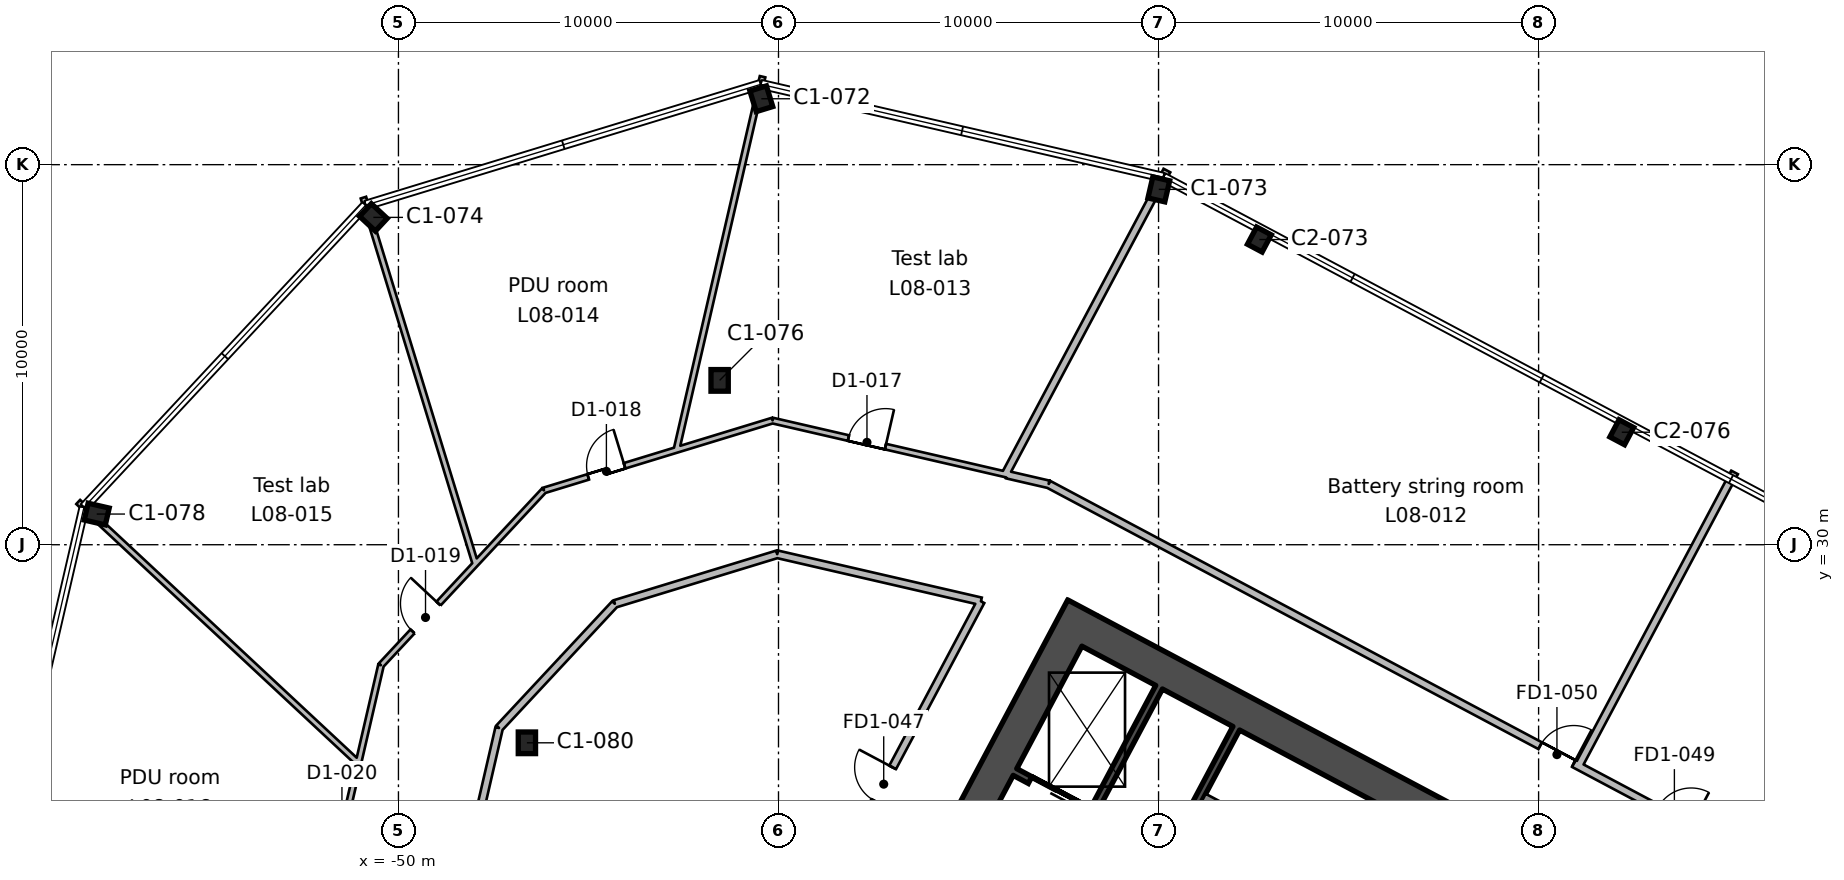
"""IFC4 building model, lengths in metres.
Left out: names, types, materials, properties, quantities, classifications, styles, units other than length and angle.
Written with IfcOpenShell. Run it as: python <this file> out.ifc"""

import sys

from ifc_helpers import new_model, si_unit, direction, frame, frame_2d, origin, origin_2d, place, context, subcontext, project, spatial, rectangle, i_section, extrude, element, fill, save


model = new_model("IFC4")
c1 = context("Model", 3, precision=1e-05, world=origin(), true_north=direction((0.0, 1.0)))
c2 = subcontext(c1, "Body", "Model", "MODEL_VIEW")
j1 = project(units=[si_unit("LENGTHUNIT", "METRE"), si_unit("PLANEANGLEUNIT", "RADIAN")], contexts=[c1])
p1 = place(None, origin())
s1 = spatial("IfcSite", under=j1, at=p1, CompositionType="ELEMENT")
p2 = place(p1, origin())
s2 = spatial("IfcBuilding", under=s1, at=p2, CompositionType="ELEMENT")
p3 = place(p2, frame((0.0, 0.0, 44.6)))
s3 = spatial("IfcBuildingStorey", under=s2, at=p3, CompositionType="ELEMENT", Elevation=44.6)
for number, where, z_axis, x_axis in (
    (1, (-46.62, 24.788, 0.0), (0.0, 0.0, 1.0), (1.0, 0.0, 0.0)),
    (2, (-57.939, 30.807, 0.0), (0.0, 0.0, 1.0), (-0.225, -0.974, 0.0)),
):
    element("IfcColumn", number, at=place(p3, frame(where, z_axis=z_axis, x_axis=x_axis)), inside=s3, PredefinedType="COLUMN", context=c2, shape_type="SweptSolid", body=[
        extrude(i_section(OverallWidth=0.455, OverallDepth=0.569, WebThickness=0.078, FlangeThickness=0.125, FilletRadius=0.015, at=origin_2d()), origin(), (0.0, 0.0, 1.0), 5.4),
    ])
p4 = place(p3, frame((-17.811, 32.96, 0.0), z_axis=(0.0, 0.0, 1.0), x_axis=(-0.882947592859, 0.469471562786, 0.0)))
e3 = element("IfcColumn", 3, at=p4, inside=s3, PredefinedType="COLUMN", context=c2, shape_type="SweptSolid", body=[
    extrude(i_section(OverallWidth=0.437, OverallDepth=0.513, WebThickness=0.061, FlangeThickness=0.097, FilletRadius=0.015, at=origin_2d()), origin(), (0.0, 0.0, 1.0), 5.4),
])
p5 = place(p3, frame((-41.549, 34.324, 0.0), z_axis=(0.0, 0.0, 1.0), x_axis=(1.0, 0.0, 0.0)))
e4 = element("IfcColumn", 4, at=p5, inside=s3, PredefinedType="COLUMN", context=c2, shape_type="SweptSolid", body=[
    extrude(i_section(OverallWidth=0.455, OverallDepth=0.569, WebThickness=0.078, FlangeThickness=0.125, FilletRadius=0.015, at=origin_2d()), origin(), (0.0, 0.0, 1.0), 5.4),
])
p6 = place(p3, frame((-27.347, 38.03, 0.0), z_axis=(0.0, 0.0, 1.0), x_axis=(-0.882947592859, 0.469471562786, 0.0)))
e5 = element("IfcColumn", 5, at=p6, inside=s3, PredefinedType="COLUMN", context=c2, shape_type="SweptSolid", body=[
    extrude(i_section(OverallWidth=0.437, OverallDepth=0.513, WebThickness=0.061, FlangeThickness=0.097, FilletRadius=0.015, at=origin_2d()), origin(), (0.0, 0.0, 1.0), 5.4),
])
for number, where, z_axis, x_axis in (
    (6, (-50.66, 38.613, 0.0), (0.0, 0.0, 1.0), (-0.682, -0.731, 0.0)),
    (7, (-29.993, 39.35, 0.0), (0.0, 0.0, 1.0), (-0.974, 0.225, 0.0)),
    (8, (-40.452, 41.734, 0.0), (0.0, 0.0, 1.0), (-0.956, -0.292, 0.0)),
):
    element("IfcColumn", number, at=place(p3, frame(where, z_axis=z_axis, x_axis=x_axis)), inside=s3, PredefinedType="COLUMN", context=c2, shape_type="SweptSolid", body=[
        extrude(i_section(OverallWidth=0.455, OverallDepth=0.569, WebThickness=0.078, FlangeThickness=0.125, FilletRadius=0.015, at=origin_2d()), origin(), (0.0, 0.0, 1.0), 5.4),
    ])
p7 = place(p3, frame((-31.992, 28.336, 0.0), z_axis=(0.0, 0.0, 1.0), x_axis=(-0.46947084998, -0.882947971864, 0.0)))
e9 = element("IfcWall", 9, at=p7, inside=s3, PredefinedType="SHEAR", context=c2, shape_type="SweptSolid", body=[
    extrude(rectangle(XDim=20.0, YDim=0.9, at=frame_2d((10.0, 0.0))), origin(), (0.0, 0.0, 1.0), 5.4),
])
p8 = place(p7, frame((10.6, 0.0, 0.0)))
e10 = element("IfcOpeningElement", 10, at=p8, cuts=e9, PredefinedType="OPENING", context=c2, shape_type="SweptSolid", body=[
    extrude(rectangle(XDim=2.4, YDim=2.4, at=frame_2d((1.2, 1.2))), frame((0.0, 0.46, 0.0), z_axis=(0.0, -1.0, 0.0), x_axis=(1.0, 0.0, 0.0)), (0.0, 0.0, 1.0), 0.92),
])
p9 = place(p3, frame((-13.97, 18.244, 0.0), z_axis=(0.0, 0.0, 1.0), x_axis=(-0.88294509198, 0.469476266226, 0.0)))
e11 = element("IfcWall", 11, at=p9, inside=s3, PredefinedType="SHEAR", context=c2, shape_type="SweptSolid", body=[
    extrude(rectangle(XDim=20.2, YDim=0.9, at=frame_2d((10.1, 0.0))), origin(), (0.0, 0.0, 1.0), 5.4),
])
p10 = place(p3, frame((-27.955, 25.171, 0.0), z_axis=(0.0, 0.0, 1.0), x_axis=(-0.469480409012, -0.88294288918, 0.0)))
e12 = element("IfcWall", 12, at=p10, inside=s3, PredefinedType="SHEAR", context=c2, shape_type="SweptSolid", body=[
    extrude(rectangle(XDim=7.3, YDim=0.2, at=frame_2d((3.65, 0.0))), origin(), (0.0, 0.0, 1.0), 5.4),
])
p11 = place(p3, frame((-29.986, 26.25, 0.0), z_axis=(0.0, 0.0, 1.0), x_axis=(-0.469494272526, -0.882935517501, 0.0)))
e13 = element("IfcWall", 13, at=p11, inside=s3, PredefinedType="SHEAR", context=c2, shape_type="SweptSolid", body=[
    extrude(rectangle(XDim=3.65, YDim=0.2, at=frame_2d((1.825, 0.0))), origin(), (0.0, 0.0, 1.0), 5.4),
])
p12 = place(p3, frame((-24.215, 20.917, 0.0), z_axis=(0.0, 0.0, 1.0), x_axis=(-0.882964314875, 0.469440111896, 0.0)))
e14 = element("IfcWall", 14, at=p12, inside=s3, PredefinedType="SOLIDWALL", context=c2, shape_type="SweptSolid", body=[
    extrude(rectangle(XDim=5.2, YDim=0.2, at=frame_2d((2.6, 0.0))), origin(), (0.0, 0.0, 1.0), 5.4),
])
p13 = place(p3, frame((-29.804, 21.906, 0.0), z_axis=(0.0, 0.0, 1.0), x_axis=(-0.882960433586, 0.469447412093, 0.0)))
e15 = element("IfcWall", 15, at=p13, inside=s3, PredefinedType="SHEAR", context=c2, shape_type="SweptSolid", body=[
    extrude(rectangle(XDim=4.5, YDim=0.2, at=frame_2d((2.25, 0.0))), origin(), (0.0, 0.0, 1.0), 5.4),
])
p14 = place(p13, frame((2.65, 0.0, 0.0)))
e16 = element("IfcOpeningElement", 16, at=p14, cuts=e15, PredefinedType="OPENING", context=c2, shape_type="SweptSolid", body=[
    extrude(rectangle(XDim=1.4, YDim=2.4, at=frame_2d((0.7, 1.2))), frame((0.0, 0.11, 0.0), z_axis=(0.0, -1.0, 0.0), x_axis=(1.0, 0.0, 0.0)), (0.0, 0.0, 1.0), 0.22),
])
p15 = place(p3, frame((-58.427, 31.125, 0.0), z_axis=(0.0, 0.0, 1.0), x_axis=(0.731473963822, -0.681869371838, 0.0)))
e17 = element("IfcWall", 17, at=p15, inside=s3, PredefinedType="PARTITIONING", context=c2, shape_type="SweptSolid", body=[
    extrude(rectangle(XDim=10.08, YDim=0.15, at=frame_2d((5.04, 0.0))), origin(), (0.0, 0.0, 1.0), 4.95),
])
p16 = place(p3, frame((-51.041, 24.311, 0.0), z_axis=(0.0, 0.0, 1.0), x_axis=(-0.224893203367, -0.974383418927, 0.0)))
e18 = element("IfcWall", 18, at=p16, inside=s3, PredefinedType="PARTITIONING", context=c2, shape_type="SweptSolid", body=[
    extrude(rectangle(XDim=3.704, YDim=0.15, at=frame_2d((1.852, 0.0))), origin(), (0.0, 0.0, 1.0), 4.95),
])
p17 = place(p16, frame((1.482, 0.0, 0.0)))
e19 = element("IfcOpeningElement", 19, at=p17, cuts=e18, PredefinedType="OPENING", context=c2, shape_type="SweptSolid", body=[
    extrude(rectangle(XDim=1.0, YDim=2.1, at=frame_2d((0.5, 1.05))), frame((0.0, 0.085, 0.0), z_axis=(0.0, -1.0, 0.0), x_axis=(1.0, 0.0, 0.0)), (0.0, 0.0, 1.0), 0.17),
])
p18 = place(p3, frame((-47.933, 29.538, 0.0), z_axis=(0.0, 0.0, 1.0), x_axis=(-0.682088017664, -0.731270084277, 0.0)))
e20 = element("IfcWall", 20, at=p18, inside=s3, PredefinedType="PARTITIONING", context=c2, shape_type="SweptSolid", body=[
    extrude(rectangle(XDim=3.703, YDim=0.15, at=frame_2d((1.852, 0.0))), origin(), (0.0, 0.0, 1.0), 4.95),
])
p19 = place(p18, frame((1.486, 0.0, 0.0)))
e21 = element("IfcOpeningElement", 21, at=p19, cuts=e20, PredefinedType="OPENING", context=c2, shape_type="SweptSolid", body=[
    extrude(rectangle(XDim=1.0, YDim=2.1, at=frame_2d((0.5, 1.05))), frame((0.0, 0.085, 0.0), z_axis=(0.0, -1.0, 0.0), x_axis=(1.0, 0.0, 0.0)), (0.0, 0.0, 1.0), 0.17),
])
p20 = place(p3, frame((-50.459, 26.83, 0.0), z_axis=(0.0, 0.0, 1.0), x_axis=(-0.225121568864, -0.974330682691, 0.0)))
e22 = element("IfcWall", 22, at=p20, inside=s3, PredefinedType="PARTITIONING", context=c2, shape_type="SweptSolid", body=[
    extrude(rectangle(XDim=2.585, YDim=0.15, at=frame_2d((1.293, 0.0))), origin(), (0.0, 0.0, 1.0), 4.95),
])
p21 = place(p3, frame((-50.922, 39.133, 0.0), z_axis=(0.0, 0.0, 1.0), x_axis=(0.292463432429, -0.956276707178, 0.0)))
e23 = element("IfcWall", 23, at=p21, inside=s3, PredefinedType="PARTITIONING", context=c2, shape_type="SweptSolid", body=[
    extrude(rectangle(XDim=10.08, YDim=0.15, at=frame_2d((5.04, 0.0))), origin(), (0.0, 0.0, 1.0), 4.95),
])
p22 = place(p3, frame((-48.138, 21.768, 0.0), z_axis=(0.0, 0.0, 1.0), x_axis=(0.224910471472, 0.974379433189, 0.0)))
e24 = element("IfcWall", 24, at=p22, inside=s3, PredefinedType="PARTITIONING", context=c2, shape_type="SweptSolid", body=[
    extrude(rectangle(XDim=3.499, YDim=0.2, at=frame_2d((1.749, 0.0))), origin(), (0.0, 0.0, 1.0), 4.95),
])
p23 = place(p3, frame((-47.351, 25.177, 0.0), z_axis=(0.0, 0.0, 1.0), x_axis=(0.681950982626, 0.731397878925, 0.0)))
e25 = element("IfcWall", 25, at=p23, inside=s3, PredefinedType="PARTITIONING", context=c2, shape_type="SweptSolid", body=[
    extrude(rectangle(XDim=2.464, YDim=0.2, at=frame_2d((1.232, 0.0))), origin(), (0.0, 0.0, 1.0), 4.95),
])
p24 = place(p3, frame((-42.653, 32.504, 0.0), z_axis=(0.0, 0.0, 1.0), x_axis=(-0.95632425254, -0.292307926687, 0.0)))
e26 = element("IfcWall", 26, at=p24, inside=s3, PredefinedType="PARTITIONING", context=c2, shape_type="SweptSolid", body=[
    extrude(rectangle(XDim=3.677, YDim=0.15, at=frame_2d((1.839, 0.0))), origin(), (0.0, 0.0, 1.0), 4.95),
])
p25 = place(p24, frame((1.461, 0.0, 0.0)))
e27 = element("IfcOpeningElement", 27, at=p25, cuts=e26, PredefinedType="OPENING", context=c2, shape_type="SweptSolid", body=[
    extrude(rectangle(XDim=1.0, YDim=2.1, at=frame_2d((0.5, 1.05))), frame((0.0, 0.085, 0.0), z_axis=(0.0, -1.0, 0.0), x_axis=(1.0, 0.0, 0.0)), (0.0, 0.0, 1.0), 0.17),
])
p26 = place(p3, frame((-46.17, 31.429, 0.0), z_axis=(0.0, 0.0, 1.0), x_axis=(-0.68198172509, -0.731369213628, 0.0)))
e28 = element("IfcWall", 28, at=p26, inside=s3, PredefinedType="PARTITIONING", context=c2, shape_type="SweptSolid", body=[
    extrude(rectangle(XDim=2.585, YDim=0.15, at=frame_2d((1.293, 0.0))), origin(), (0.0, 0.0, 1.0), 4.95),
])
p27 = place(p3, frame((-40.034, 29.749, 0.0), z_axis=(0.0, 0.0, 1.0), x_axis=(-0.956357512161, -0.29219909126, 0.0)))
e29 = element("IfcWall", 29, at=p27, inside=s3, PredefinedType="PARTITIONING", context=c2, shape_type="SweptSolid", body=[
    extrude(rectangle(XDim=4.466, YDim=0.2, at=frame_2d((2.233, 0.0))), origin(), (0.0, 0.0, 1.0), 4.95),
])
p28 = place(p3, frame((-44.305, 28.444, 0.0), z_axis=(0.0, 0.0, 1.0), x_axis=(-0.681931663517, -0.731415891469, 0.0)))
e30 = element("IfcWall", 30, at=p28, inside=s3, PredefinedType="PARTITIONING", context=c2, shape_type="SweptSolid", body=[
    extrude(rectangle(XDim=2.003, YDim=0.2, at=frame_2d((1.001, 0.0))), origin(), (0.0, 0.0, 1.0), 4.95),
])
p29 = place(p3, frame((-40.419, 42.315, 0.0), z_axis=(0.0, 0.0, 1.0), x_axis=(-0.224924959868, -0.974376088802, 0.0)))
e31 = element("IfcWall", 31, at=p29, inside=s3, PredefinedType="PARTITIONING", context=c2, shape_type="SweptSolid", body=[
    extrude(rectangle(XDim=10.079, YDim=0.15, at=frame_2d((5.04, 0.0))), origin(), (0.0, 0.0, 1.0), 4.95),
])
p30 = place(p3, frame((-40.156, 33.267, 0.0), z_axis=(0.0, 0.0, 1.0), x_axis=(-0.956331245239, -0.292285048164, 0.0)))
e32 = element("IfcWall", 32, at=p30, inside=s3, PredefinedType="PARTITIONING", context=c2, shape_type="SweptSolid", body=[
    extrude(rectangle(XDim=2.611, YDim=0.15, at=frame_2d((1.306, 0.0))), origin(), (0.0, 0.0, 1.0), 4.95),
])
p31 = place(p3, frame((-40.157, 33.267, 0.0), z_axis=(0.0, 0.0, 1.0), x_axis=(0.974407195754, -0.224790161846, 0.0)))
e33 = element("IfcWall", 33, at=p31, inside=s3, PredefinedType="PARTITIONING", context=c2, shape_type="SweptSolid", body=[
    extrude(rectangle(XDim=5.143, YDim=0.15, at=frame_2d((2.571, 0.0))), origin(), (0.0, 0.0, 1.0), 4.95),
])
p32 = place(p31, frame((2.05, 0.0, 0.0)))
e34 = element("IfcOpeningElement", 34, at=p32, cuts=e33, PredefinedType="OPENING", context=c2, shape_type="SweptSolid", body=[
    extrude(rectangle(XDim=1.0, YDim=2.1, at=frame_2d((0.5, 1.05))), frame((0.0, 0.085, 0.0), z_axis=(0.0, -1.0, 0.0), x_axis=(1.0, 0.0, 0.0)), (0.0, 0.0, 1.0), 0.17),
])
p33 = place(p3, frame((-34.673, 28.512, 0.0), z_axis=(0.0, 0.0, 1.0), x_axis=(-0.974393439342, 0.224849784003, 0.0)))
e35 = element("IfcWall", 35, at=p33, inside=s3, PredefinedType="PARTITIONING", context=c2, shape_type="SweptSolid", body=[
    extrude(rectangle(XDim=5.502, YDim=0.2, at=frame_2d((2.751, 0.0))), origin(), (0.0, 0.0, 1.0), 4.95),
])
p34 = place(p3, frame((-34.673, 28.512, 0.0), z_axis=(0.0, 0.0, 1.0), x_axis=(-0.469440333182, -0.882964197226, 0.0)))
e36 = element("IfcWall", 36, at=p34, inside=s3, PredefinedType="PARTITIONING", context=c2, shape_type="SweptSolid", body=[
    extrude(rectangle(XDim=10.977, YDim=0.2, at=frame_2d((5.488, 0.0))), origin(), (0.0, 0.0, 1.0), 4.95),
])
p35 = place(p34, frame((4.95, 0.0, 0.0)))
e37 = element("IfcOpeningElement", 37, at=p35, cuts=e36, PredefinedType="OPENING", context=c2, shape_type="SweptSolid", body=[
    extrude(rectangle(XDim=1.0, YDim=2.1, at=frame_2d((0.5, 1.05))), frame((0.0, 0.11, 0.0), z_axis=(0.0, -1.0, 0.0), x_axis=(1.0, 0.0, 0.0)), (0.0, 0.0, 1.0), 0.22),
])
p36 = place(p3, frame((-35.146, 32.111, 0.0), z_axis=(0.0, 0.0, 1.0), x_axis=(0.974164552701, -0.225839377125, 0.0)))
e38 = element("IfcWall", 38, at=p36, inside=s3, PredefinedType="PARTITIONING", context=c2, shape_type="SweptSolid", body=[
    extrude(rectangle(XDim=1.183, YDim=0.15, at=frame_2d((0.591, 0.0))), origin(), (0.0, 0.0, 1.0), 4.95),
])
p37 = place(p3, frame((-29.779, 39.846, 0.0), z_axis=(0.0, 0.0, 1.0), x_axis=(-0.469479235169, -0.882943513338, 0.0)))
e39 = element("IfcWall", 39, at=p37, inside=s3, PredefinedType="PARTITIONING", context=c2, shape_type="SweptSolid", body=[
    extrude(rectangle(XDim=9.052, YDim=0.2, at=frame_2d((4.526, 0.0))), origin(), (0.0, 0.0, 1.0), 4.95),
])
p38 = place(p3, frame((-32.894, 31.59, 0.0), z_axis=(0.0, 0.0, 1.0), x_axis=(-0.97437296606, 0.22493848717, 0.0)))
e40 = element("IfcWall", 40, at=p38, inside=s3, PredefinedType="PARTITIONING", context=c2, shape_type="SweptSolid", body=[
    extrude(rectangle(XDim=1.129, YDim=0.2, at=frame_2d((0.564, 0.0))), origin(), (0.0, 0.0, 1.0), 4.95),
])
p39 = place(p3, frame((-32.894, 31.59, 0.0), z_axis=(0.0, 0.0, 1.0), x_axis=(0.882948512555, -0.469469833085, 0.0)))
e41 = element("IfcWall", 41, at=p39, inside=s3, PredefinedType="PARTITIONING", context=c2, shape_type="SweptSolid", body=[
    extrude(rectangle(XDim=37.255, YDim=0.2, at=frame_2d((18.627, 0.0))), origin(), (0.0, 0.0, 1.0), 4.95),
])
p40 = place(p39, frame((18.15, 0.0, 0.0)))
e42 = element("IfcOpeningElement", 42, at=p40, cuts=e41, PredefinedType="OPENING", context=c2, shape_type="SweptSolid", body=[
    extrude(rectangle(XDim=1.0, YDim=2.1, at=frame_2d((0.5, 1.05))), frame((0.0, 0.11, 0.0), z_axis=(0.0, -1.0, 0.0), x_axis=(1.0, 0.0, 0.0)), (0.0, 0.0, 1.0), 0.22),
])
p41 = place(p39, frame((14.65, 0.0, 0.0)))
e43 = element("IfcOpeningElement", 43, at=p41, cuts=e41, PredefinedType="OPENING", context=c2, shape_type="SweptSolid", body=[
    extrude(rectangle(XDim=1.0, YDim=2.1, at=frame_2d((0.5, 1.05))), frame((0.0, 0.11, 0.0), z_axis=(0.0, -1.0, 0.0), x_axis=(1.0, 0.0, 0.0)), (0.0, 0.0, 1.0), 0.22),
])
p42 = place(p3, frame((-14.844, 31.903, 0.0), z_axis=(0.0, 0.0, 1.0), x_axis=(-0.469374180568, -0.882999365014, 0.0)))
e44 = element("IfcWall", 44, at=p42, inside=s3, PredefinedType="PARTITIONING", context=c2, shape_type="SweptSolid", body=[
    extrude(rectangle(XDim=8.75, YDim=0.2, at=frame_2d((4.375, 0.0))), origin(), (0.0, 0.0, 1.0), 4.95),
])
p43 = place(p14, origin())
e45 = element("IfcDoor", 45, at=p43, inside=s3, OperationType="DOUBLE_DOOR_SLIDING", PredefinedType="DOOR", context=c2, shape_type="SweptSolid", body=[
    extrude(rectangle(XDim=1.4, YDim=2.4, at=frame_2d((0.7, 1.2))), frame((0.0, 0.025, 0.0), z_axis=(0.0, -1.0, 0.0), x_axis=(1.0, 0.0, 0.0)), (0.0, 0.0, 1.0), 0.05),
])
fill(e16, e45)
p44 = place(p35, frame((1.0, 0.0, 0.0), z_axis=(0.0, 0.0, 1.0), x_axis=(-1.0, 0.0, 0.0)))
e46 = element("IfcDoor", 46, at=p44, inside=s3, OperationType="SINGLE_SWING_RIGHT", PredefinedType="DOOR", context=c2, shape_type="SweptSolid", body=[
    extrude(rectangle(XDim=1.0, YDim=2.1, at=frame_2d((0.5, 1.05))), frame((0.0, 0.025, 0.0), z_axis=(0.0, -1.0, 0.0), x_axis=(1.0, 0.0, 0.0)), (0.0, 0.0, 1.0), 0.05),
])
fill(e37, e46)
p45 = place(p41, origin())
e47 = element("IfcDoor", 47, at=p45, inside=s3, OperationType="SINGLE_SWING_RIGHT", PredefinedType="DOOR", context=c2, shape_type="SweptSolid", body=[
    extrude(rectangle(XDim=1.0, YDim=2.1, at=frame_2d((0.5, 1.05))), frame((0.0, 0.025, 0.0), z_axis=(0.0, -1.0, 0.0), x_axis=(1.0, 0.0, 0.0)), (0.0, 0.0, 1.0), 0.05),
])
fill(e43, e47)
p46 = place(p32, origin())
e48 = element("IfcDoor", 48, at=p46, inside=s3, OperationType="SINGLE_SWING_RIGHT", PredefinedType="DOOR", context=c2, shape_type="SweptSolid", body=[
    extrude(rectangle(XDim=1.0, YDim=2.1, at=frame_2d((0.5, 1.05))), frame((0.0, 0.025, 0.0), z_axis=(0.0, -1.0, 0.0), x_axis=(1.0, 0.0, 0.0)), (0.0, 0.0, 1.0), 0.05),
])
fill(e34, e48)
p47 = place(p25, frame((1.0, 0.0, 0.0), z_axis=(0.0, 0.0, 1.0), x_axis=(-1.0, 0.0, 0.0)))
e49 = element("IfcDoor", 49, at=p47, inside=s3, OperationType="SINGLE_SWING_RIGHT", PredefinedType="DOOR", context=c2, shape_type="SweptSolid", body=[
    extrude(rectangle(XDim=1.0, YDim=2.1, at=frame_2d((0.5, 1.05))), frame((0.0, 0.025, 0.0), z_axis=(0.0, -1.0, 0.0), x_axis=(1.0, 0.0, 0.0)), (0.0, 0.0, 1.0), 0.05),
])
fill(e27, e49)
p48 = place(p19, frame((1.0, 0.0, 0.0), z_axis=(0.0, 0.0, 1.0), x_axis=(-1.0, 0.0, 0.0)))
e50 = element("IfcDoor", 50, at=p48, inside=s3, OperationType="SINGLE_SWING_RIGHT", PredefinedType="DOOR", context=c2, shape_type="SweptSolid", body=[
    extrude(rectangle(XDim=1.0, YDim=2.1, at=frame_2d((0.5, 1.05))), frame((0.0, 0.025, 0.0), z_axis=(0.0, -1.0, 0.0), x_axis=(1.0, 0.0, 0.0)), (0.0, 0.0, 1.0), 0.05),
])
fill(e21, e50)
save(model, sys.argv[1])
